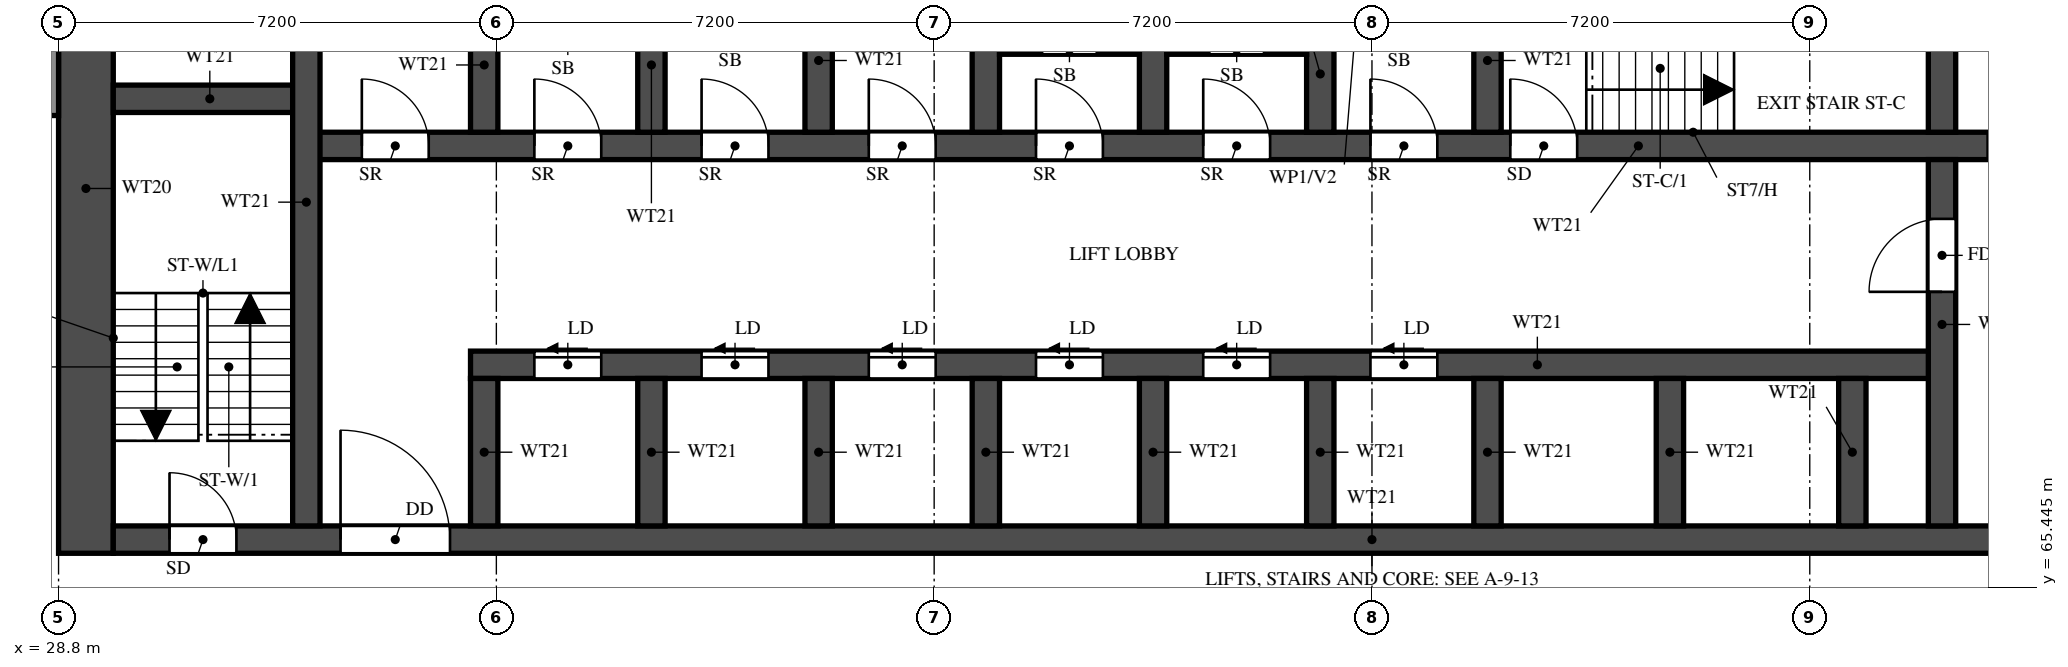
"""IFC4 building model, lengths in metres.
Left out: names, types, materials, properties, quantities, classifications, styles, units other than length and angle.
Written with IfcOpenShell. Run it as: python <this file> out.ifc"""

import sys

from ifc_helpers import new_model, si_unit, direction, frame, frame_2d, origin, place, context, subcontext, project, spatial, rectangle, extrude, element, fill, save


model = new_model("IFC4")
c1 = context("Model", 3, precision=1e-05, world=origin(), true_north=direction((0.0, 1.0)))
c2 = subcontext(c1, "Body", "Model", "MODEL_VIEW")
j1 = project(units=[si_unit("LENGTHUNIT", "METRE"), si_unit("PLANEANGLEUNIT", "RADIAN")], contexts=[c1])
p1 = place(None, origin())
s1 = spatial("IfcSite", under=j1, at=p1, CompositionType="ELEMENT")
p2 = place(p1, origin())
s2 = spatial("IfcBuilding", under=s1, at=p2, CompositionType="ELEMENT")
p3 = place(p2, frame((0.0, 0.0, 90.0)))
s3 = spatial("IfcBuildingStorey", under=s2, at=p3, CompositionType="ELEMENT", Elevation=90.0)
p4 = place(p3, frame((29.25, 66.0, 0.0), z_axis=(0.0, 0.0, 1.0), x_axis=(0.0, 1.0, 0.0)))
e1 = element("IfcWall", 1, at=p4, inside=s3, PredefinedType="SHEAR", context=c2, shape_type="SweptSolid", body=[
    extrude(rectangle(XDim=12.0, YDim=0.9, at=frame_2d((6.0, 0.0))), origin(), (0.0, 0.0, 1.0), 3.18),
])
p5 = place(p3, frame((29.7, 66.225, 0.0), z_axis=(0.0, 0.0, 1.0), x_axis=(1.0, 0.0, 0.0)))
e2 = element("IfcWall", 2, at=p5, inside=s3, PredefinedType="SHEAR", context=c2, shape_type="SweptSolid", body=[
    extrude(rectangle(XDim=41.4, YDim=0.45, at=frame_2d((20.7, 0.0))), origin(), (0.0, 0.0, 1.0), 3.18),
])
p6 = place(p5, frame((0.925, 0.0, 0.0)))
e3 = element("IfcOpeningElement", 3, at=p6, cuts=e2, PredefinedType="OPENING", context=c2, shape_type="SweptSolid", body=[
    extrude(rectangle(XDim=1.1, YDim=2.1, at=frame_2d((0.55, 1.05))), frame((0.0, 0.235, 0.0), z_axis=(0.0, -1.0, 0.0), x_axis=(1.0, 0.0, 0.0)), (0.0, 0.0, 1.0), 0.47),
])
p7 = place(p5, frame((3.738, 0.0, 0.0)))
e4 = element("IfcOpeningElement", 4, at=p7, cuts=e2, PredefinedType="OPENING", context=c2, shape_type="SweptSolid", body=[
    extrude(rectangle(XDim=1.8, YDim=2.1, at=frame_2d((0.9, 1.05))), frame((0.0, 0.235, 0.0), z_axis=(0.0, -1.0, 0.0), x_axis=(1.0, 0.0, 0.0)), (0.0, 0.0, 1.0), 0.47),
])
p8 = place(p3, frame((35.575, 69.1, 0.0), z_axis=(0.0, 0.0, 1.0), x_axis=(1.0, 0.0, 0.0)))
e5 = element("IfcWall", 5, at=p8, inside=s3, PredefinedType="SHEAR", context=c2, shape_type="SweptSolid", body=[
    extrude(rectangle(XDim=24.2, YDim=0.45, at=frame_2d((12.1, 0.0))), origin(), (0.0, 0.0, 1.0), 3.18),
])
p9 = place(p8, frame((1.05, 0.0, 0.0)))
e6 = element("IfcOpeningElement", 6, at=p9, cuts=e5, PredefinedType="OPENING", context=c2, shape_type="SweptSolid", body=[
    extrude(rectangle(XDim=1.1, YDim=2.1, at=frame_2d((0.55, 1.05))), frame((0.0, 0.235, 0.0), z_axis=(0.0, -1.0, 0.0), x_axis=(1.0, 0.0, 0.0)), (0.0, 0.0, 1.0), 0.47),
])
p10 = place(p8, frame((3.8, 0.0, 0.0)))
e7 = element("IfcOpeningElement", 7, at=p10, cuts=e5, PredefinedType="OPENING", context=c2, shape_type="SweptSolid", body=[
    extrude(rectangle(XDim=1.1, YDim=2.1, at=frame_2d((0.55, 1.05))), frame((0.0, 0.235, 0.0), z_axis=(0.0, -1.0, 0.0), x_axis=(1.0, 0.0, 0.0)), (0.0, 0.0, 1.0), 0.47),
])
p11 = place(p8, frame((6.55, 0.0, 0.0)))
e8 = element("IfcOpeningElement", 8, at=p11, cuts=e5, PredefinedType="OPENING", context=c2, shape_type="SweptSolid", body=[
    extrude(rectangle(XDim=1.1, YDim=2.1, at=frame_2d((0.55, 1.05))), frame((0.0, 0.235, 0.0), z_axis=(0.0, -1.0, 0.0), x_axis=(1.0, 0.0, 0.0)), (0.0, 0.0, 1.0), 0.47),
])
p12 = place(p8, frame((9.3, 0.0, 0.0)))
e9 = element("IfcOpeningElement", 9, at=p12, cuts=e5, PredefinedType="OPENING", context=c2, shape_type="SweptSolid", body=[
    extrude(rectangle(XDim=1.1, YDim=2.1, at=frame_2d((0.55, 1.05))), frame((0.0, 0.235, 0.0), z_axis=(0.0, -1.0, 0.0), x_axis=(1.0, 0.0, 0.0)), (0.0, 0.0, 1.0), 0.47),
])
p13 = place(p8, frame((12.05, 0.0, 0.0)))
e10 = element("IfcOpeningElement", 10, at=p13, cuts=e5, PredefinedType="OPENING", context=c2, shape_type="SweptSolid", body=[
    extrude(rectangle(XDim=1.1, YDim=2.1, at=frame_2d((0.55, 1.05))), frame((0.0, 0.235, 0.0), z_axis=(0.0, -1.0, 0.0), x_axis=(1.0, 0.0, 0.0)), (0.0, 0.0, 1.0), 0.47),
])
p14 = place(p8, frame((14.8, 0.0, 0.0)))
e11 = element("IfcOpeningElement", 11, at=p14, cuts=e5, PredefinedType="OPENING", context=c2, shape_type="SweptSolid", body=[
    extrude(rectangle(XDim=1.1, YDim=2.1, at=frame_2d((0.55, 1.05))), frame((0.0, 0.235, 0.0), z_axis=(0.0, -1.0, 0.0), x_axis=(1.0, 0.0, 0.0)), (0.0, 0.0, 1.0), 0.47),
])
p15 = place(p3, frame((32.875, 72.7, 0.0), z_axis=(0.0, 0.0, 1.0), x_axis=(1.0, 0.0, 0.0)))
e12 = element("IfcWall", 12, at=p15, inside=s3, PredefinedType="SHEAR", context=c2, shape_type="SweptSolid", body=[
    extrude(rectangle(XDim=35.05, YDim=0.45, at=frame_2d((17.525, 0.0))), origin(), (0.0, 0.0, 1.0), 3.18),
])
p16 = place(p15, frame((19.8, 0.0, 0.0)))
e13 = element("IfcOpeningElement", 13, at=p16, cuts=e12, PredefinedType="OPENING", context=c2, shape_type="SweptSolid", body=[
    extrude(rectangle(XDim=1.1, YDim=2.1, at=frame_2d((0.55, 1.05))), frame((0.0, 0.235, 0.0), z_axis=(0.0, -1.0, 0.0), x_axis=(1.0, 0.0, 0.0)), (0.0, 0.0, 1.0), 0.47),
])
p17 = place(p15, frame((27.65, 0.0, 0.0)))
e14 = element("IfcOpeningElement", 14, at=p17, cuts=e12, PredefinedType="OPENING", context=c2, shape_type="SweptSolid", body=[
    extrude(rectangle(XDim=1.1, YDim=2.1, at=frame_2d((0.55, 1.05))), frame((0.0, 0.235, 0.0), z_axis=(0.0, -1.0, 0.0), x_axis=(1.0, 0.0, 0.0)), (0.0, 0.0, 1.0), 0.47),
])
p18 = place(p15, frame((30.25, 0.0, 0.0)))
e15 = element("IfcOpeningElement", 15, at=p18, cuts=e12, PredefinedType="OPENING", context=c2, shape_type="SweptSolid", body=[
    extrude(rectangle(XDim=1.1, YDim=2.1, at=frame_2d((0.55, 1.05))), frame((0.0, 0.235, 0.0), z_axis=(0.0, -1.0, 0.0), x_axis=(1.0, 0.0, 0.0)), (0.0, 0.0, 1.0), 0.47),
])
p19 = place(p15, frame((3.75, 0.0, 0.0)))
e16 = element("IfcOpeningElement", 16, at=p19, cuts=e12, PredefinedType="OPENING", context=c2, shape_type="SweptSolid", body=[
    extrude(rectangle(XDim=1.1, YDim=2.1, at=frame_2d((0.55, 1.05))), frame((0.0, 0.235, 0.0), z_axis=(0.0, -1.0, 0.0), x_axis=(1.0, 0.0, 0.0)), (0.0, 0.0, 1.0), 0.47),
])
p20 = place(p15, frame((6.5, 0.0, 0.0)))
e17 = element("IfcOpeningElement", 17, at=p20, cuts=e12, PredefinedType="OPENING", context=c2, shape_type="SweptSolid", body=[
    extrude(rectangle(XDim=1.1, YDim=2.1, at=frame_2d((0.55, 1.05))), frame((0.0, 0.235, 0.0), z_axis=(0.0, -1.0, 0.0), x_axis=(1.0, 0.0, 0.0)), (0.0, 0.0, 1.0), 0.47),
])
p21 = place(p15, frame((9.25, 0.0, 0.0)))
e18 = element("IfcOpeningElement", 18, at=p21, cuts=e12, PredefinedType="OPENING", context=c2, shape_type="SweptSolid", body=[
    extrude(rectangle(XDim=1.1, YDim=2.1, at=frame_2d((0.55, 1.05))), frame((0.0, 0.235, 0.0), z_axis=(0.0, -1.0, 0.0), x_axis=(1.0, 0.0, 0.0)), (0.0, 0.0, 1.0), 0.47),
])
p22 = place(p15, frame((12.0, 0.0, 0.0)))
e19 = element("IfcOpeningElement", 19, at=p22, cuts=e12, PredefinedType="OPENING", context=c2, shape_type="SweptSolid", body=[
    extrude(rectangle(XDim=1.1, YDim=2.1, at=frame_2d((0.55, 1.05))), frame((0.0, 0.235, 0.0), z_axis=(0.0, -1.0, 0.0), x_axis=(1.0, 0.0, 0.0)), (0.0, 0.0, 1.0), 0.47),
])
p23 = place(p15, frame((14.75, 0.0, 0.0)))
e20 = element("IfcOpeningElement", 20, at=p23, cuts=e12, PredefinedType="OPENING", context=c2, shape_type="SweptSolid", body=[
    extrude(rectangle(XDim=1.1, YDim=2.1, at=frame_2d((0.55, 1.05))), frame((0.0, 0.235, 0.0), z_axis=(0.0, -1.0, 0.0), x_axis=(1.0, 0.0, 0.0)), (0.0, 0.0, 1.0), 0.47),
])
p24 = place(p15, frame((17.5, 0.0, 0.0)))
e21 = element("IfcOpeningElement", 21, at=p24, cuts=e12, PredefinedType="OPENING", context=c2, shape_type="SweptSolid", body=[
    extrude(rectangle(XDim=1.1, YDim=2.1, at=frame_2d((0.55, 1.05))), frame((0.0, 0.235, 0.0), z_axis=(0.0, -1.0, 0.0), x_axis=(1.0, 0.0, 0.0)), (0.0, 0.0, 1.0), 0.47),
])
p25 = place(p15, frame((0.913, 0.0, 0.0)))
e22 = element("IfcOpeningElement", 22, at=p25, cuts=e12, PredefinedType="OPENING", context=c2, shape_type="SweptSolid", body=[
    extrude(rectangle(XDim=1.1, YDim=2.1, at=frame_2d((0.55, 1.05))), frame((0.0, 0.235, 0.0), z_axis=(0.0, -1.0, 0.0), x_axis=(1.0, 0.0, 0.0)), (0.0, 0.0, 1.0), 0.47),
])
p26 = place(p3, frame((29.7, 73.475, 0.0), z_axis=(0.0, 0.0, 1.0), x_axis=(1.0, 0.0, 0.0)))
e23 = element("IfcWall", 23, at=p26, inside=s3, PredefinedType="SHEAR", context=c2, shape_type="SweptSolid", body=[
    extrude(rectangle(XDim=3.175, YDim=0.45, at=frame_2d((1.587, 0.0))), origin(), (0.0, 0.0, 1.0), 3.18),
])
p27 = place(p3, frame((32.875, 66.45, 0.0), z_axis=(0.0, 0.0, 1.0), x_axis=(0.0, 1.0, 0.0)))
e24 = element("IfcWall", 24, at=p27, inside=s3, PredefinedType="SHEAR", context=c2, shape_type="SweptSolid", body=[
    extrude(rectangle(XDim=10.65, YDim=0.45, at=frame_2d((5.325, 0.0))), origin(), (0.0, 0.0, 1.0), 3.18),
])
p28 = place(p3, frame((59.775, 66.45, 0.0), z_axis=(0.0, 0.0, 1.0), x_axis=(0.0, 1.0, 0.0)))
e25 = element("IfcWall", 25, at=p28, inside=s3, PredefinedType="SHEAR", context=c2, shape_type="SweptSolid", body=[
    extrude(rectangle(XDim=6.025, YDim=0.45, at=frame_2d((3.013, 0.0))), origin(), (0.0, 0.0, 1.0), 3.18),
])
p29 = place(p28, frame((3.85, 0.0, 0.0)))
e26 = element("IfcOpeningElement", 26, at=p29, cuts=e25, PredefinedType="OPENING", context=c2, shape_type="SweptSolid", body=[
    extrude(rectangle(XDim=1.2, YDim=2.1, at=frame_2d((0.6, 1.05))), frame((0.0, 0.235, 0.0), z_axis=(0.0, -1.0, 0.0), x_axis=(1.0, 0.0, 0.0)), (0.0, 0.0, 1.0), 0.47),
])
p30 = place(p3, frame((59.775, 72.925, 0.0), z_axis=(0.0, 0.0, 1.0), x_axis=(0.0, 1.0, 0.0)))
e27 = element("IfcWall", 27, at=p30, inside=s3, PredefinedType="SHEAR", context=c2, shape_type="SweptSolid", body=[
    extrude(rectangle(XDim=2.95, YDim=0.45, at=frame_2d((1.475, 0.0))), origin(), (0.0, 0.0, 1.0), 3.18),
])
for number, where, z_axis, x_axis in (
    (28, (35.8, 66.45, 0.0), (0.0, 0.0, 1.0), (0.0, 1.0, 0.0)),
    (29, (38.55, 66.45, 0.0), (0.0, 0.0, 1.0), (0.0, 1.0, 0.0)),
    (30, (41.3, 66.45, 0.0), (0.0, 0.0, 1.0), (0.0, 1.0, 0.0)),
    (31, (44.05, 66.45, 0.0), (0.0, 0.0, 1.0), (0.0, 1.0, 0.0)),
    (32, (46.8, 66.45, 0.0), (0.0, 0.0, 1.0), (0.0, 1.0, 0.0)),
    (33, (49.55, 66.45, 0.0), (0.0, 0.0, 1.0), (0.0, 1.0, 0.0)),
    (34, (52.3, 66.45, 0.0), (0.0, 0.0, 1.0), (0.0, 1.0, 0.0)),
    (35, (55.3, 66.45, 0.0), (0.0, 0.0, 1.0), (0.0, 1.0, 0.0)),
    (36, (58.3, 66.45, 0.0), (0.0, 0.0, 1.0), (0.0, 1.0, 0.0)),
):
    element("IfcWall", number, at=place(p3, frame(where, z_axis=z_axis, x_axis=x_axis)), inside=s3, PredefinedType="SHEAR", context=c2, shape_type="SweptSolid", body=[
        extrude(rectangle(XDim=2.425, YDim=0.45, at=frame_2d((1.212, 0.0))), origin(), (0.0, 0.0, 1.0), 3.18),
    ])
for number, where, z_axis, x_axis in (
    (37, (35.8, 72.925, 0.0), (0.0, 0.0, 1.0), (0.0, 1.0, 0.0)),
    (38, (38.55, 72.925, 0.0), (0.0, 0.0, 1.0), (0.0, 1.0, 0.0)),
    (39, (41.3, 72.925, 0.0), (0.0, 0.0, 1.0), (0.0, 1.0, 0.0)),
    (40, (44.05, 72.925, 0.0), (0.0, 0.0, 1.0), (0.0, 1.0, 0.0)),
    (41, (46.8, 72.925, 0.0), (0.0, 0.0, 1.0), (0.0, 1.0, 0.0)),
    (42, (49.55, 72.925, 0.0), (0.0, 0.0, 1.0), (0.0, 1.0, 0.0)),
    (43, (52.3, 72.925, 0.0), (0.0, 0.0, 1.0), (0.0, 1.0, 0.0)),
):
    element("IfcWall", number, at=place(p3, frame(where, z_axis=z_axis, x_axis=x_axis)), inside=s3, PredefinedType="SHEAR", context=c2, shape_type="SweptSolid", body=[
        extrude(rectangle(XDim=2.95, YDim=0.45, at=frame_2d((1.475, 0.0))), origin(), (0.0, 0.0, 1.0), 3.18),
    ])
p31 = place(p3, frame((44.275, 74.282, 0.0), z_axis=(0.0, 0.0, 1.0), x_axis=(1.0, 0.0, 0.0)))
e44 = element("IfcWall", 44, at=p31, inside=s3, PredefinedType="PARTITIONING", context=c2, shape_type="SweptSolid", body=[
    extrude(rectangle(XDim=2.3, YDim=0.15, at=frame_2d((1.15, 0.0))), origin(), (0.0, 0.0, 1.0), 3.18),
])
p32 = place(p31, frame((0.7, 0.0, 0.0)))
e45 = element("IfcOpeningElement", 45, at=p32, cuts=e44, PredefinedType="OPENING", context=c2, shape_type="SweptSolid", body=[
    extrude(rectangle(XDim=0.9, YDim=2.1, at=frame_2d((0.45, 1.05))), frame((0.0, 0.085, 0.0), z_axis=(0.0, -1.0, 0.0), x_axis=(1.0, 0.0, 0.0)), (0.0, 0.0, 1.0), 0.17),
])
p33 = place(p3, frame((47.025, 74.282, 0.0), z_axis=(0.0, 0.0, 1.0), x_axis=(1.0, 0.0, 0.0)))
e46 = element("IfcWall", 46, at=p33, inside=s3, PredefinedType="PARTITIONING", context=c2, shape_type="SweptSolid", body=[
    extrude(rectangle(XDim=2.3, YDim=0.15, at=frame_2d((1.15, 0.0))), origin(), (0.0, 0.0, 1.0), 3.18),
])
p34 = place(p33, frame((0.7, 0.0, 0.0)))
e47 = element("IfcOpeningElement", 47, at=p34, cuts=e46, PredefinedType="OPENING", context=c2, shape_type="SweptSolid", body=[
    extrude(rectangle(XDim=0.9, YDim=2.1, at=frame_2d((0.45, 1.05))), frame((0.0, 0.085, 0.0), z_axis=(0.0, -1.0, 0.0), x_axis=(1.0, 0.0, 0.0)), (0.0, 0.0, 1.0), 0.17),
])
p35 = place(p3, frame((28.7, 73.2, 0.0), z_axis=(0.0, 0.0, 1.0), x_axis=(0.0, 1.0, 0.0)))
e48 = element("IfcWall", 48, at=p35, inside=s3, PredefinedType="SOLIDWALL", context=c2, shape_type="SweptSolid", body=[
    extrude(rectangle(XDim=4.8, YDim=0.2, at=frame_2d((2.4, 0.0))), origin(), (0.0, 0.0, 1.0), 3.18),
])
p36 = place(p6, origin())
e49 = element("IfcDoor", 49, at=p36, inside=s3, OperationType="SINGLE_SWING_LEFT", PredefinedType="DOOR", context=c2, shape_type="SweptSolid", body=[
    extrude(rectangle(XDim=1.1, YDim=2.1, at=frame_2d((0.55, 1.05))), frame((0.0, 0.025, 0.0), z_axis=(0.0, -1.0, 0.0), x_axis=(1.0, 0.0, 0.0)), (0.0, 0.0, 1.0), 0.05),
])
fill(e3, e49)
p37 = place(p16, origin())
e50 = element("IfcDoor", 50, at=p37, inside=s3, OperationType="SINGLE_SWING_LEFT", PredefinedType="DOOR", context=c2, shape_type="SweptSolid", body=[
    extrude(rectangle(XDim=1.1, YDim=2.1, at=frame_2d((0.55, 1.05))), frame((0.0, 0.025, 0.0), z_axis=(0.0, -1.0, 0.0), x_axis=(1.0, 0.0, 0.0)), (0.0, 0.0, 1.0), 0.05),
])
fill(e13, e50)
p38 = place(p7, origin())
e51 = element("IfcDoor", 51, at=p38, inside=s3, OperationType="DOUBLE_DOOR_SINGLE_SWING", PredefinedType="DOOR", context=c2, shape_type="SweptSolid", body=[
    extrude(rectangle(XDim=1.8, YDim=2.1, at=frame_2d((0.9, 1.05))), frame((0.0, 0.025, 0.0), z_axis=(0.0, -1.0, 0.0), x_axis=(1.0, 0.0, 0.0)), (0.0, 0.0, 1.0), 0.05),
])
fill(e4, e51)
p39 = place(p29, origin())
e52 = element("IfcDoor", 52, at=p39, inside=s3, OperationType="SINGLE_SWING_RIGHT", PredefinedType="DOOR", context=c2, shape_type="SweptSolid", body=[
    extrude(rectangle(XDim=1.2, YDim=2.1, at=frame_2d((0.6, 1.05))), frame((0.0, 0.025, 0.0), z_axis=(0.0, -1.0, 0.0), x_axis=(1.0, 0.0, 0.0)), (0.0, 0.0, 1.0), 0.05),
])
fill(e26, e52)
p40 = place(p17, origin())
e53 = element("IfcDoor", 53, at=p40, inside=s3, OperationType="SLIDING_TO_LEFT", PredefinedType="DOOR", context=c2, shape_type="SweptSolid", body=[
    extrude(rectangle(XDim=1.1, YDim=2.1, at=frame_2d((0.55, 1.05))), frame((0.0, 0.025, 0.0), z_axis=(0.0, -1.0, 0.0), x_axis=(1.0, 0.0, 0.0)), (0.0, 0.0, 1.0), 0.05),
])
fill(e14, e53)
p41 = place(p9, origin())
e54 = element("IfcDoor", 54, at=p41, inside=s3, OperationType="SLIDING_TO_LEFT", PredefinedType="DOOR", context=c2, shape_type="SweptSolid", body=[
    extrude(rectangle(XDim=1.1, YDim=2.1, at=frame_2d((0.55, 1.05))), frame((0.0, 0.025, 0.0), z_axis=(0.0, -1.0, 0.0), x_axis=(1.0, 0.0, 0.0)), (0.0, 0.0, 1.0), 0.05),
])
fill(e6, e54)
p42 = place(p10, origin())
e55 = element("IfcDoor", 55, at=p42, inside=s3, OperationType="SLIDING_TO_LEFT", PredefinedType="DOOR", context=c2, shape_type="SweptSolid", body=[
    extrude(rectangle(XDim=1.1, YDim=2.1, at=frame_2d((0.55, 1.05))), frame((0.0, 0.025, 0.0), z_axis=(0.0, -1.0, 0.0), x_axis=(1.0, 0.0, 0.0)), (0.0, 0.0, 1.0), 0.05),
])
fill(e7, e55)
p43 = place(p11, origin())
e56 = element("IfcDoor", 56, at=p43, inside=s3, OperationType="SLIDING_TO_LEFT", PredefinedType="DOOR", context=c2, shape_type="SweptSolid", body=[
    extrude(rectangle(XDim=1.1, YDim=2.1, at=frame_2d((0.55, 1.05))), frame((0.0, 0.025, 0.0), z_axis=(0.0, -1.0, 0.0), x_axis=(1.0, 0.0, 0.0)), (0.0, 0.0, 1.0), 0.05),
])
fill(e8, e56)
p44 = place(p12, origin())
e57 = element("IfcDoor", 57, at=p44, inside=s3, OperationType="SLIDING_TO_LEFT", PredefinedType="DOOR", context=c2, shape_type="SweptSolid", body=[
    extrude(rectangle(XDim=1.1, YDim=2.1, at=frame_2d((0.55, 1.05))), frame((0.0, 0.025, 0.0), z_axis=(0.0, -1.0, 0.0), x_axis=(1.0, 0.0, 0.0)), (0.0, 0.0, 1.0), 0.05),
])
fill(e9, e57)
p45 = place(p13, origin())
e58 = element("IfcDoor", 58, at=p45, inside=s3, OperationType="SLIDING_TO_LEFT", PredefinedType="DOOR", context=c2, shape_type="SweptSolid", body=[
    extrude(rectangle(XDim=1.1, YDim=2.1, at=frame_2d((0.55, 1.05))), frame((0.0, 0.025, 0.0), z_axis=(0.0, -1.0, 0.0), x_axis=(1.0, 0.0, 0.0)), (0.0, 0.0, 1.0), 0.05),
])
fill(e10, e58)
p46 = place(p14, origin())
e59 = element("IfcDoor", 59, at=p46, inside=s3, OperationType="SLIDING_TO_LEFT", PredefinedType="DOOR", context=c2, shape_type="SweptSolid", body=[
    extrude(rectangle(XDim=1.1, YDim=2.1, at=frame_2d((0.55, 1.05))), frame((0.0, 0.025, 0.0), z_axis=(0.0, -1.0, 0.0), x_axis=(1.0, 0.0, 0.0)), (0.0, 0.0, 1.0), 0.05),
])
fill(e11, e59)
p47 = place(p19, origin())
e60 = element("IfcDoor", 60, at=p47, inside=s3, OperationType="SINGLE_SWING_LEFT", PredefinedType="DOOR", context=c2, shape_type="SweptSolid", body=[
    extrude(rectangle(XDim=1.1, YDim=2.1, at=frame_2d((0.55, 1.05))), frame((0.0, 0.025, 0.0), z_axis=(0.0, -1.0, 0.0), x_axis=(1.0, 0.0, 0.0)), (0.0, 0.0, 1.0), 0.05),
])
fill(e16, e60)
p48 = place(p20, origin())
e61 = element("IfcDoor", 61, at=p48, inside=s3, OperationType="SINGLE_SWING_LEFT", PredefinedType="DOOR", context=c2, shape_type="SweptSolid", body=[
    extrude(rectangle(XDim=1.1, YDim=2.1, at=frame_2d((0.55, 1.05))), frame((0.0, 0.025, 0.0), z_axis=(0.0, -1.0, 0.0), x_axis=(1.0, 0.0, 0.0)), (0.0, 0.0, 1.0), 0.05),
])
fill(e17, e61)
p49 = place(p21, origin())
e62 = element("IfcDoor", 62, at=p49, inside=s3, OperationType="SINGLE_SWING_LEFT", PredefinedType="DOOR", context=c2, shape_type="SweptSolid", body=[
    extrude(rectangle(XDim=1.1, YDim=2.1, at=frame_2d((0.55, 1.05))), frame((0.0, 0.025, 0.0), z_axis=(0.0, -1.0, 0.0), x_axis=(1.0, 0.0, 0.0)), (0.0, 0.0, 1.0), 0.05),
])
fill(e18, e62)
p50 = place(p22, origin())
e63 = element("IfcDoor", 63, at=p50, inside=s3, OperationType="SINGLE_SWING_LEFT", PredefinedType="DOOR", context=c2, shape_type="SweptSolid", body=[
    extrude(rectangle(XDim=1.1, YDim=2.1, at=frame_2d((0.55, 1.05))), frame((0.0, 0.025, 0.0), z_axis=(0.0, -1.0, 0.0), x_axis=(1.0, 0.0, 0.0)), (0.0, 0.0, 1.0), 0.05),
])
fill(e19, e63)
p51 = place(p23, origin())
e64 = element("IfcDoor", 64, at=p51, inside=s3, OperationType="SINGLE_SWING_LEFT", PredefinedType="DOOR", context=c2, shape_type="SweptSolid", body=[
    extrude(rectangle(XDim=1.1, YDim=2.1, at=frame_2d((0.55, 1.05))), frame((0.0, 0.025, 0.0), z_axis=(0.0, -1.0, 0.0), x_axis=(1.0, 0.0, 0.0)), (0.0, 0.0, 1.0), 0.05),
])
fill(e20, e64)
p52 = place(p24, origin())
e65 = element("IfcDoor", 65, at=p52, inside=s3, OperationType="SINGLE_SWING_LEFT", PredefinedType="DOOR", context=c2, shape_type="SweptSolid", body=[
    extrude(rectangle(XDim=1.1, YDim=2.1, at=frame_2d((0.55, 1.05))), frame((0.0, 0.025, 0.0), z_axis=(0.0, -1.0, 0.0), x_axis=(1.0, 0.0, 0.0)), (0.0, 0.0, 1.0), 0.05),
])
fill(e21, e65)
p53 = place(p25, origin())
e66 = element("IfcDoor", 66, at=p53, inside=s3, OperationType="SINGLE_SWING_LEFT", PredefinedType="DOOR", context=c2, shape_type="SweptSolid", body=[
    extrude(rectangle(XDim=1.1, YDim=2.1, at=frame_2d((0.55, 1.05))), frame((0.0, 0.025, 0.0), z_axis=(0.0, -1.0, 0.0), x_axis=(1.0, 0.0, 0.0)), (0.0, 0.0, 1.0), 0.05),
])
fill(e22, e66)
save(model, sys.argv[1])
